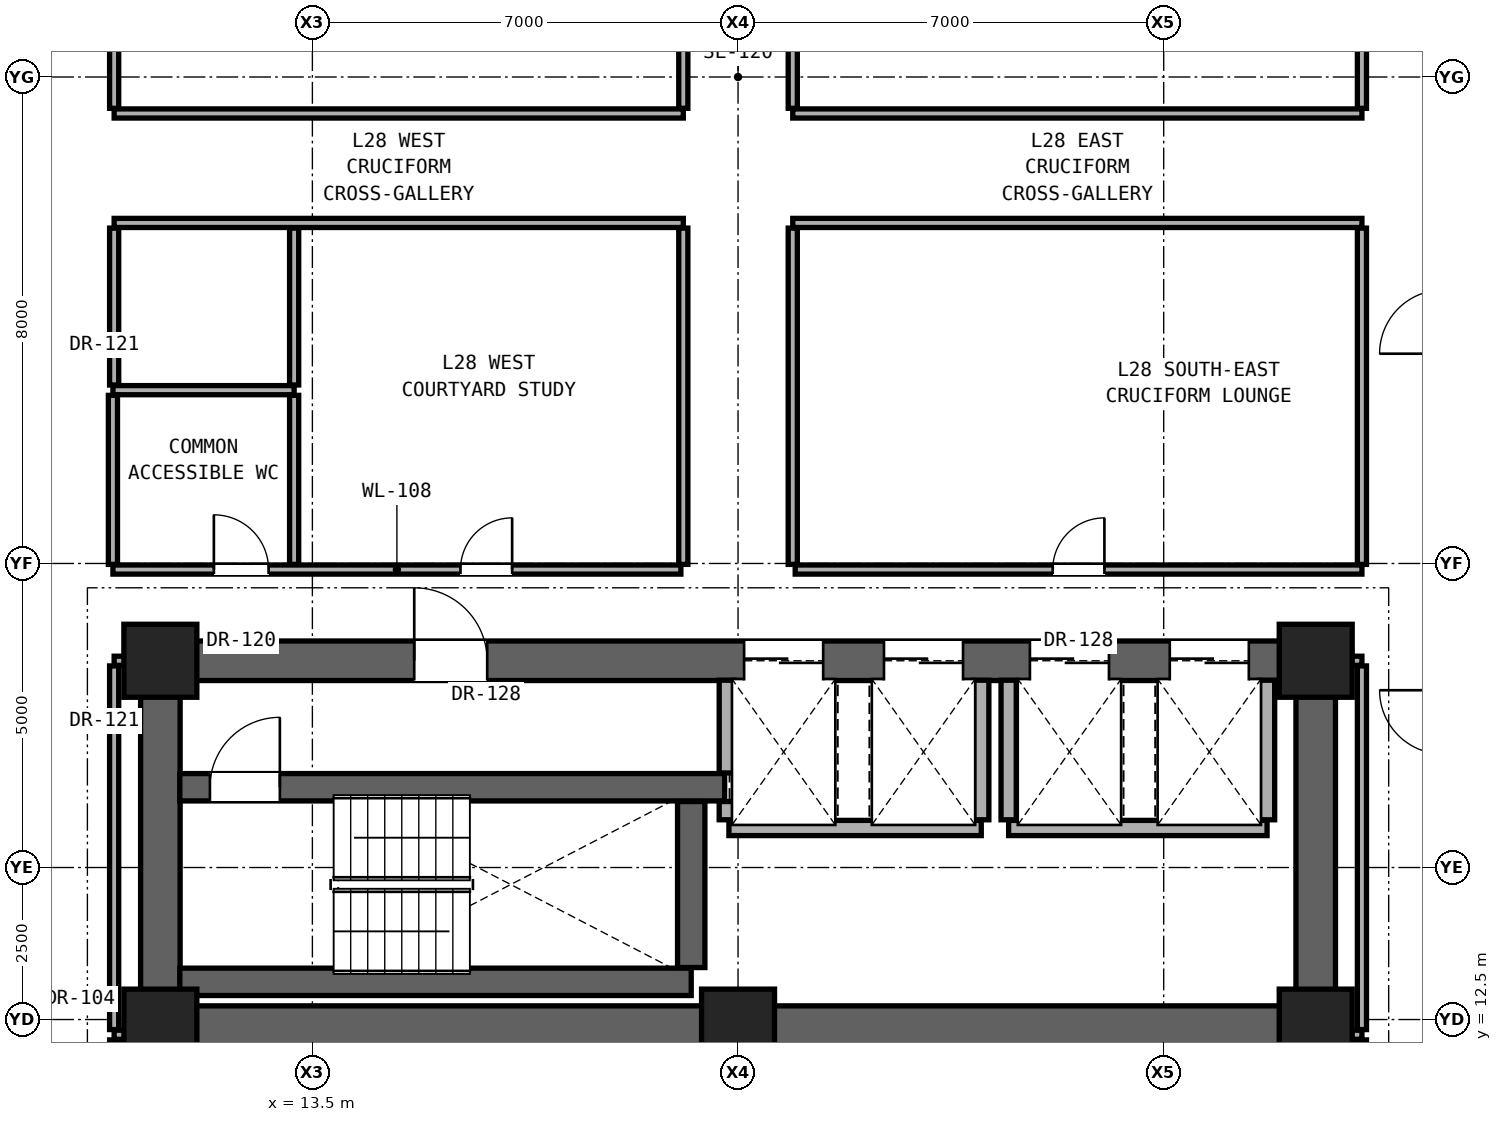
"""IFC4 building model, lengths in metres.
Left out: names, types, materials, properties, quantities, classifications, styles, units other than length and angle.
Written with IfcOpenShell. Run it as: python <this file> out.ifc"""

import sys

from ifc_helpers import new_model, si_unit, direction, frame, frame_2d, origin, origin_2d, place, context, subcontext, project, spatial, rectangle, extrude, element, fill, save


model = new_model("IFC4")
c1 = context("Model", 3, precision=1e-05, world=origin(), true_north=direction((0.0, 1.0)))
c2 = subcontext(c1, "Body", "Model", "MODEL_VIEW")
j1 = project(units=[si_unit("LENGTHUNIT", "METRE"), si_unit("PLANEANGLEUNIT", "RADIAN")], contexts=[c1])
p1 = place(None, origin())
s1 = spatial("IfcSite", under=j1, at=p1, CompositionType="ELEMENT")
p2 = place(p1, origin())
s2 = spatial("IfcBuilding", under=s1, at=p2, CompositionType="ELEMENT")
p3 = place(p2, frame((0.0, 0.0, 101.6)))
s3 = spatial("IfcBuildingStorey", under=s2, at=p3, CompositionType="ELEMENT", Elevation=101.6)
for number, where, z_axis, x_axis in (
    (1, (11.0, 12.4, 0.0), (0.0, 0.0, 1.0), (1.0, 0.0, 0.0)),
    (2, (20.5, 12.4, 0.0), (0.0, 0.0, 1.0), (1.0, 0.0, 0.0)),
    (3, (30.0, 12.4, 0.0), (0.0, 0.0, 1.0), (1.0, 0.0, 0.0)),
    (4, (11.0, 18.4, 0.0), (0.0, 0.0, 1.0), (1.0, 0.0, 0.0)),
    (5, (30.0, 18.4, 0.0), (0.0, 0.0, 1.0), (1.0, 0.0, 0.0)),
):
    element("IfcColumn", number, at=place(p3, frame(where, z_axis=z_axis, x_axis=x_axis)), inside=s3, PredefinedType="COLUMN", context=c2, shape_type="SweptSolid", body=[
        extrude(rectangle(XDim=1.2, YDim=1.2, at=origin_2d()), origin(), (0.0, 0.0, 1.0), 3.3),
    ])
p4 = place(p3, frame((11.0, 12.4, 0.0), z_axis=(0.0, 0.0, 1.0), x_axis=(1.0, 0.0, 0.0)))
e6 = element("IfcWall", 6, at=p4, inside=s3, PredefinedType="SHEAR", context=c2, shape_type="SweptSolid", body=[
    extrude(rectangle(XDim=19.0, YDim=0.65, at=frame_2d((9.5, 0.0))), origin(), (0.0, 0.0, 1.0), 3.08),
])
for number, where, z_axis, x_axis in (
    (7, (11.0, 12.4, 0.0), (0.0, 0.0, 1.0), (0.0, 1.0, 0.0)),
    (8, (30.0, 12.4, 0.0), (0.0, 0.0, 1.0), (0.0, 1.0, 0.0)),
):
    element("IfcWall", number, at=place(p3, frame(where, z_axis=z_axis, x_axis=x_axis)), inside=s3, PredefinedType="SHEAR", context=c2, shape_type="SweptSolid", body=[
        extrude(rectangle(XDim=6.0, YDim=0.65, at=frame_2d((3.0, 0.0))), origin(), (0.0, 0.0, 1.0), 3.08),
    ])
p5 = place(p3, frame((11.0, 18.4, 0.0), z_axis=(0.0, 0.0, 1.0), x_axis=(1.0, 0.0, 0.0)))
e9 = element("IfcWall", 9, at=p5, inside=s3, PredefinedType="SHEAR", context=c2, shape_type="SweptSolid", body=[
    extrude(rectangle(XDim=19.0, YDim=0.65, at=frame_2d((9.5, 0.0))), origin(), (0.0, 0.0, 1.0), 3.08),
])
p6 = place(p5, frame((4.175, 0.0, 0.0)))
e10 = element("IfcOpeningElement", 10, at=p6, cuts=e9, PredefinedType="OPENING", context=c2, shape_type="SweptSolid", body=[
    extrude(rectangle(XDim=1.2, YDim=2.25, at=frame_2d((0.6, 1.125))), frame((0.0, 0.335, 0.0), z_axis=(0.0, -1.0, 0.0), x_axis=(1.0, 0.0, 0.0)), (0.0, 0.0, 1.0), 0.67),
])
p7 = place(p5, frame((9.6, 0.0, 0.0)))
e11 = element("IfcOpeningElement", 11, at=p7, cuts=e9, PredefinedType="OPENING", context=c2, shape_type="SweptSolid", body=[
    extrude(rectangle(XDim=1.3, YDim=2.3, at=frame_2d((0.65, 1.15))), frame((0.0, 0.335, 0.0), z_axis=(0.0, -1.0, 0.0), x_axis=(1.0, 0.0, 0.0)), (0.0, 0.0, 1.0), 0.67),
])
p8 = place(p5, frame((11.9, 0.0, 0.0)))
e12 = element("IfcOpeningElement", 12, at=p8, cuts=e9, PredefinedType="OPENING", context=c2, shape_type="SweptSolid", body=[
    extrude(rectangle(XDim=1.3, YDim=2.3, at=frame_2d((0.65, 1.15))), frame((0.0, 0.335, 0.0), z_axis=(0.0, -1.0, 0.0), x_axis=(1.0, 0.0, 0.0)), (0.0, 0.0, 1.0), 0.67),
])
p9 = place(p5, frame((14.3, 0.0, 0.0)))
e13 = element("IfcOpeningElement", 13, at=p9, cuts=e9, PredefinedType="OPENING", context=c2, shape_type="SweptSolid", body=[
    extrude(rectangle(XDim=1.3, YDim=2.3, at=frame_2d((0.65, 1.15))), frame((0.0, 0.335, 0.0), z_axis=(0.0, -1.0, 0.0), x_axis=(1.0, 0.0, 0.0)), (0.0, 0.0, 1.0), 0.67),
])
p10 = place(p5, frame((16.6, 0.0, 0.0)))
e14 = element("IfcOpeningElement", 14, at=p10, cuts=e9, PredefinedType="OPENING", context=c2, shape_type="SweptSolid", body=[
    extrude(rectangle(XDim=1.3, YDim=2.3, at=frame_2d((0.65, 1.15))), frame((0.0, 0.335, 0.0), z_axis=(0.0, -1.0, 0.0), x_axis=(1.0, 0.0, 0.0)), (0.0, 0.0, 1.0), 0.67),
])
for number, where, z_axis, x_axis in (
    (15, (10.24, 12.25, 0.0), (0.0, 0.0, 1.0), (1.0, 0.0, 0.0)),
    (16, (30.32, 12.25, 0.0), (0.0, 0.0, 1.0), (1.0, 0.0, 0.0)),
):
    element("IfcWall", number, at=place(p3, frame(where, z_axis=z_axis, x_axis=x_axis)), inside=s3, PredefinedType="PARTITIONING", context=c2, shape_type="SweptSolid", body=[
        extrude(rectangle(XDim=0.44, YDim=0.15, at=frame_2d((0.22, 0.0))), origin(), (0.0, 0.0, 1.0), 3.08),
    ])
p11 = place(p3, frame((11.32, 13.12, 0.0), z_axis=(0.0, 0.0, 1.0), x_axis=(1.0, 0.0, 0.0)))
e17 = element("IfcWall", 17, at=p11, inside=s3, PredefinedType="SHEAR", context=c2, shape_type="SweptSolid", body=[
    extrude(rectangle(XDim=8.41, YDim=0.45, at=frame_2d((4.205, 0.0))), origin(), (0.0, 0.0, 1.0), 3.08),
])
p12 = place(p3, frame((20.35, 15.65, 0.0), z_axis=(0.0, 0.0, 1.0), x_axis=(1.0, 0.0, 0.0)))
e18 = element("IfcWall", 18, at=p12, inside=s3, PredefinedType="SOLIDWALL", context=c2, shape_type="SweptSolid", body=[
    extrude(rectangle(XDim=4.15, YDim=0.25, at=frame_2d((2.075, 0.0))), origin(), (0.0, 0.0, 1.0), 3.08),
])
p13 = place(p3, frame((24.95, 15.65, 0.0), z_axis=(0.0, 0.0, 1.0), x_axis=(1.0, 0.0, 0.0)))
e19 = element("IfcWall", 19, at=p13, inside=s3, PredefinedType="SOLIDWALL", context=c2, shape_type="SweptSolid", body=[
    extrude(rectangle(XDim=4.25, YDim=0.25, at=frame_2d((2.125, 0.0))), origin(), (0.0, 0.0, 1.0), 3.08),
])
p14 = place(p3, frame((11.32, 16.32, 0.0), z_axis=(0.0, 0.0, 1.0), x_axis=(1.0, 0.0, 0.0)))
e20 = element("IfcWall", 20, at=p14, inside=s3, PredefinedType="SHEAR", context=c2, shape_type="SweptSolid", body=[
    extrude(rectangle(XDim=8.96, YDim=0.45, at=frame_2d((4.48, 0.0))), origin(), (0.0, 0.0, 1.0), 3.08),
])
p15 = place(p14, frame((0.495, 0.0, 0.0)))
e21 = element("IfcOpeningElement", 21, at=p15, cuts=e20, PredefinedType="OPENING", context=c2, shape_type="SweptSolid", body=[
    extrude(rectangle(XDim=1.15, YDim=2.2, at=frame_2d((0.575, 1.1))), frame((0.0, 0.235, 0.0), z_axis=(0.0, -1.0, 0.0), x_axis=(1.0, 0.0, 0.0)), (0.0, 0.0, 1.0), 0.47),
])
for number, where, z_axis, x_axis in (
    (22, (10.24, 18.4, 0.0), (0.0, 0.0, 1.0), (1.0, 0.0, 0.0)),
    (23, (30.32, 18.4, 0.0), (0.0, 0.0, 1.0), (1.0, 0.0, 0.0)),
):
    element("IfcWall", number, at=place(p3, frame(where, z_axis=z_axis, x_axis=x_axis)), inside=s3, PredefinedType="PARTITIONING", context=c2, shape_type="SweptSolid", body=[
        extrude(rectangle(XDim=0.44, YDim=0.15, at=frame_2d((0.22, 0.0))), origin(), (0.0, 0.0, 1.0), 2.456),
    ])
p16 = place(p3, frame((10.22, 19.9, 0.0), z_axis=(0.0, 0.0, 1.0), x_axis=(1.0, 0.0, 0.0)))
e24 = element("IfcWall", 24, at=p16, inside=s3, PredefinedType="PARTITIONING", context=c2, shape_type="SweptSolid", body=[
    extrude(rectangle(XDim=9.34, YDim=0.15, at=frame_2d((4.67, 0.0))), origin(), (0.0, 0.0, 1.0), 2.124),
])
p17 = place(p16, frame((1.66, 0.0, 0.0)))
e25 = element("IfcOpeningElement", 25, at=p17, cuts=e24, PredefinedType="OPENING", context=c2, shape_type="SweptSolid", body=[
    extrude(rectangle(XDim=0.9, YDim=2.1, at=frame_2d((0.45, 1.05))), frame((0.0, 0.085, 0.0), z_axis=(0.0, -1.0, 0.0), x_axis=(1.0, 0.0, 0.0)), (0.0, 0.0, 1.0), 0.17),
])
p18 = place(p16, frame((5.715, 0.0, 0.0)))
e26 = element("IfcOpeningElement", 26, at=p18, cuts=e24, PredefinedType="OPENING", context=c2, shape_type="SweptSolid", body=[
    extrude(rectangle(XDim=0.85, YDim=2.01, at=frame_2d((0.425, 1.005))), frame((0.0, 0.085, 0.0), z_axis=(0.0, -1.0, 0.0), x_axis=(1.0, 0.0, 0.0)), (0.0, 0.0, 1.0), 0.17),
])
p19 = place(p3, frame((21.44, 19.9, 0.0), z_axis=(0.0, 0.0, 1.0), x_axis=(1.0, 0.0, 0.0)))
e27 = element("IfcWall", 27, at=p19, inside=s3, PredefinedType="PARTITIONING", context=c2, shape_type="SweptSolid", body=[
    extrude(rectangle(XDim=9.32, YDim=0.15, at=frame_2d((4.66, 0.0))), origin(), (0.0, 0.0, 1.0), 2.124),
])
p20 = place(p19, frame((4.235, 0.0, 0.0)))
e28 = element("IfcOpeningElement", 28, at=p20, cuts=e27, PredefinedType="OPENING", context=c2, shape_type="SweptSolid", body=[
    extrude(rectangle(XDim=0.85, YDim=2.01, at=frame_2d((0.425, 1.005))), frame((0.0, 0.085, 0.0), z_axis=(0.0, -1.0, 0.0), x_axis=(1.0, 0.0, 0.0)), (0.0, 0.0, 1.0), 0.17),
])
p21 = place(p3, frame((10.22, 22.85, 0.0), z_axis=(0.0, 0.0, 1.0), x_axis=(1.0, 0.0, 0.0)))
e29 = element("IfcWall", 29, at=p21, inside=s3, PredefinedType="PARTITIONING", context=c2, shape_type="SweptSolid", body=[
    extrude(rectangle(XDim=2.98, YDim=0.15, at=frame_2d((1.49, 0.0))), origin(), (0.0, 0.0, 1.0), 2.124),
])
for number, where, z_axis, x_axis in (
    (30, (10.24, 25.6, 0.0), (0.0, 0.0, 1.0), (1.0, 0.0, 0.0)),
    (31, (21.4, 25.6, 0.0), (0.0, 0.0, 1.0), (1.0, 0.0, 0.0)),
    (32, (10.24, 27.4, 0.0), (0.0, 0.0, 1.0), (1.0, 0.0, 0.0)),
    (33, (21.4, 27.4, 0.0), (0.0, 0.0, 1.0), (1.0, 0.0, 0.0)),
):
    element("IfcWall", number, at=place(p3, frame(where, z_axis=z_axis, x_axis=x_axis)), inside=s3, PredefinedType="PARTITIONING", context=c2, shape_type="SweptSolid", body=[
        extrude(rectangle(XDim=9.36, YDim=0.15, at=frame_2d((4.68, 0.0))), origin(), (0.0, 0.0, 1.0), 2.124),
    ])
p22 = place(p3, frame((10.22, 19.985, 0.0), z_axis=(0.0, 0.0, 1.0), x_axis=(0.0, 1.0, 0.0)))
e34 = element("IfcWall", 34, at=p22, inside=s3, PredefinedType="PARTITIONING", context=c2, shape_type="SweptSolid", body=[
    extrude(rectangle(XDim=2.78, YDim=0.15, at=frame_2d((1.39, 0.0))), origin(), (0.0, 0.0, 1.0), 3.08),
])
p23 = place(p3, frame((10.24, 9.078, 0.0), z_axis=(0.0, 0.0, 1.0), x_axis=(0.0, 1.0, 0.0)))
e35 = element("IfcWall", 35, at=p23, inside=s3, PredefinedType="PARTITIONING", context=c2, shape_type="SweptSolid", body=[
    extrude(rectangle(XDim=3.087, YDim=0.15, at=frame_2d((1.543, 0.0))), origin(), (0.0, 0.0, 1.0), 3.08),
])
p24 = place(p23, frame((1.019, 0.0, 0.0)))
e36 = element("IfcOpeningElement", 36, at=p24, cuts=e35, PredefinedType="OPENING", context=c2, shape_type="SweptSolid", body=[
    extrude(rectangle(XDim=1.05, YDim=2.2, at=frame_2d((0.525, 1.1))), frame((0.0, 0.085, 0.0), z_axis=(0.0, -1.0, 0.0), x_axis=(1.0, 0.0, 0.0)), (0.0, 0.0, 1.0), 0.17),
])
p25 = place(p3, frame((10.24, 12.335, 0.0), z_axis=(0.0, 0.0, 1.0), x_axis=(0.0, 1.0, 0.0)))
e37 = element("IfcWall", 37, at=p25, inside=s3, PredefinedType="PARTITIONING", context=c2, shape_type="SweptSolid", body=[
    extrude(rectangle(XDim=5.98, YDim=0.15, at=frame_2d((2.99, 0.0))), origin(), (0.0, 0.0, 1.0), 2.456),
])
p26 = place(p3, frame((10.24, 22.935, 0.0), z_axis=(0.0, 0.0, 1.0), x_axis=(0.0, 1.0, 0.0)))
e38 = element("IfcWall", 38, at=p26, inside=s3, PredefinedType="PARTITIONING", context=c2, shape_type="SweptSolid", body=[
    extrude(rectangle(XDim=2.58, YDim=0.15, at=frame_2d((1.29, 0.0))), origin(), (0.0, 0.0, 1.0), 2.299),
])
p27 = place(p3, frame((10.24, 27.485, 0.0), z_axis=(0.0, 0.0, 1.0), x_axis=(0.0, 1.0, 0.0)))
e39 = element("IfcWall", 39, at=p27, inside=s3, PredefinedType="PARTITIONING", context=c2, shape_type="SweptSolid", body=[
    extrude(rectangle(XDim=5.53, YDim=0.15, at=frame_2d((2.765, 0.0))), origin(), (0.0, 0.0, 1.0), 2.299),
])
p28 = place(p27, frame((2.29, 0.0, 0.0)))
e40 = element("IfcOpeningElement", 40, at=p28, cuts=e39, PredefinedType="OPENING", context=c2, shape_type="SweptSolid", body=[
    extrude(rectangle(XDim=0.95, YDim=2.15, at=frame_2d((0.475, 1.075))), frame((0.0, 0.085, 0.0), z_axis=(0.0, -1.0, 0.0), x_axis=(1.0, 0.0, 0.0)), (0.0, 0.0, 1.0), 0.17),
])
p29 = place(p3, frame((13.2, 19.985, 0.0), z_axis=(0.0, 0.0, 1.0), x_axis=(0.0, 1.0, 0.0)))
e41 = element("IfcWall", 41, at=p29, inside=s3, PredefinedType="PARTITIONING", context=c2, shape_type="SweptSolid", body=[
    extrude(rectangle(XDim=2.78, YDim=0.15, at=frame_2d((1.39, 0.0))), origin(), (0.0, 0.0, 1.0), 3.08),
])
p30 = place(p3, frame((13.2, 22.935, 0.0), z_axis=(0.0, 0.0, 1.0), x_axis=(0.0, 1.0, 0.0)))
e42 = element("IfcWall", 42, at=p30, inside=s3, PredefinedType="PARTITIONING", context=c2, shape_type="SweptSolid", body=[
    extrude(rectangle(XDim=2.58, YDim=0.15, at=frame_2d((1.29, 0.0))), origin(), (0.0, 0.0, 1.0), 2.124),
])
for number, where, z_axis, x_axis in (
    (43, (19.6, 19.985, 0.0), (0.0, 0.0, 1.0), (0.0, 1.0, 0.0)),
    (44, (19.6, 27.485, 0.0), (0.0, 0.0, 1.0), (0.0, 1.0, 0.0)),
):
    element("IfcWall", number, at=place(p3, frame(where, z_axis=z_axis, x_axis=x_axis)), inside=s3, PredefinedType="PARTITIONING", context=c2, shape_type="SweptSolid", body=[
        extrude(rectangle(XDim=5.53, YDim=0.15, at=frame_2d((2.765, 0.0))), origin(), (0.0, 0.0, 1.0), 2.124),
    ])
p31 = place(p3, frame((19.73, 13.355, 0.0), z_axis=(0.0, 0.0, 1.0), x_axis=(0.0, 1.0, 0.0)))
e45 = element("IfcWall", 45, at=p31, inside=s3, PredefinedType="SHEAR", context=c2, shape_type="SweptSolid", body=[
    extrude(rectangle(XDim=2.73, YDim=0.45, at=frame_2d((1.365, 0.0))), origin(), (0.0, 0.0, 1.0), 3.08),
])
p32 = place(p3, frame((20.315, 15.785, 0.0), z_axis=(0.0, 0.0, 1.0), x_axis=(0.0, 1.0, 0.0)))
e46 = element("IfcWall", 46, at=p32, inside=s3, PredefinedType="SOLIDWALL", context=c2, shape_type="SweptSolid", body=[
    extrude(rectangle(XDim=0.3, YDim=0.25, at=frame_2d((0.15, 0.0))), origin(), (0.0, 0.0, 1.0), 3.08),
])
p33 = place(p3, frame((20.315, 16.555, 0.0), z_axis=(0.0, 0.0, 1.0), x_axis=(0.0, 1.0, 0.0)))
e47 = element("IfcWall", 47, at=p33, inside=s3, PredefinedType="SOLIDWALL", context=c2, shape_type="SweptSolid", body=[
    extrude(rectangle(XDim=1.525, YDim=0.25, at=frame_2d((0.763, 0.0))), origin(), (0.0, 0.0, 1.0), 3.08),
])
for number, where, z_axis, x_axis in (
    (48, (21.4, 19.985, 0.0), (0.0, 0.0, 1.0), (0.0, 1.0, 0.0)),
    (49, (21.4, 27.485, 0.0), (0.0, 0.0, 1.0), (0.0, 1.0, 0.0)),
):
    element("IfcWall", number, at=place(p3, frame(where, z_axis=z_axis, x_axis=x_axis)), inside=s3, PredefinedType="PARTITIONING", context=c2, shape_type="SweptSolid", body=[
        extrude(rectangle(XDim=5.53, YDim=0.15, at=frame_2d((2.765, 0.0))), origin(), (0.0, 0.0, 1.0), 2.124),
    ])
for number, where, z_axis, x_axis in (
    (50, (24.5, 15.785, 0.0), (0.0, 0.0, 1.0), (0.0, 1.0, 0.0)),
    (51, (24.95, 15.785, 0.0), (0.0, 0.0, 1.0), (0.0, 1.0, 0.0)),
    (52, (29.2, 15.785, 0.0), (0.0, 0.0, 1.0), (0.0, 1.0, 0.0)),
):
    element("IfcWall", number, at=place(p3, frame(where, z_axis=z_axis, x_axis=x_axis)), inside=s3, PredefinedType="SOLIDWALL", context=c2, shape_type="SweptSolid", body=[
        extrude(rectangle(XDim=2.295, YDim=0.25, at=frame_2d((1.147, 0.0))), origin(), (0.0, 0.0, 1.0), 3.08),
    ])
p34 = place(p3, frame((30.76, 9.078, 0.0), z_axis=(0.0, 0.0, 1.0), x_axis=(0.0, 1.0, 0.0)))
e53 = element("IfcWall", 53, at=p34, inside=s3, PredefinedType="PARTITIONING", context=c2, shape_type="SweptSolid", body=[
    extrude(rectangle(XDim=3.087, YDim=0.15, at=frame_2d((1.543, 0.0))), origin(), (0.0, 0.0, 1.0), 3.08),
])
p35 = place(p34, frame((1.019, 0.0, 0.0)))
e54 = element("IfcOpeningElement", 54, at=p35, cuts=e53, PredefinedType="OPENING", context=c2, shape_type="SweptSolid", body=[
    extrude(rectangle(XDim=1.05, YDim=2.2, at=frame_2d((0.525, 1.1))), frame((0.0, 0.085, 0.0), z_axis=(0.0, -1.0, 0.0), x_axis=(1.0, 0.0, 0.0)), (0.0, 0.0, 1.0), 0.17),
])
p36 = place(p3, frame((30.76, 12.335, 0.0), z_axis=(0.0, 0.0, 1.0), x_axis=(0.0, 1.0, 0.0)))
e55 = element("IfcWall", 55, at=p36, inside=s3, PredefinedType="PARTITIONING", context=c2, shape_type="SweptSolid", body=[
    extrude(rectangle(XDim=5.98, YDim=0.15, at=frame_2d((2.99, 0.0))), origin(), (0.0, 0.0, 1.0), 2.456),
])
for number, where, z_axis, x_axis in (
    (56, (30.76, 19.985, 0.0), (0.0, 0.0, 1.0), (0.0, 1.0, 0.0)),
    (57, (30.76, 27.485, 0.0), (0.0, 0.0, 1.0), (0.0, 1.0, 0.0)),
):
    element("IfcWall", number, at=place(p3, frame(where, z_axis=z_axis, x_axis=x_axis)), inside=s3, PredefinedType="PARTITIONING", context=c2, shape_type="SweptSolid", body=[
        extrude(rectangle(XDim=5.53, YDim=0.15, at=frame_2d((2.765, 0.0))), origin(), (0.0, 0.0, 1.0), 2.299),
    ])
p37 = place(p6, origin())
e58 = element("IfcDoor", 58, at=p37, inside=s3, OperationType="SINGLE_SWING_LEFT", PredefinedType="DOOR", context=c2, shape_type="SweptSolid", body=[
    extrude(rectangle(XDim=1.2, YDim=2.25, at=frame_2d((0.6, 1.125))), frame((0.0, 0.025, 0.0), z_axis=(0.0, -1.0, 0.0), x_axis=(1.0, 0.0, 0.0)), (0.0, 0.0, 1.0), 0.05),
])
fill(e10, e58)
p38 = place(p15, origin())
e59 = element("IfcDoor", 59, at=p38, inside=s3, OperationType="SINGLE_SWING_RIGHT", PredefinedType="DOOR", context=c2, shape_type="SweptSolid", body=[
    extrude(rectangle(XDim=1.15, YDim=2.2, at=frame_2d((0.575, 1.1))), frame((0.0, 0.025, 0.0), z_axis=(0.0, -1.0, 0.0), x_axis=(1.0, 0.0, 0.0)), (0.0, 0.0, 1.0), 0.05),
])
fill(e21, e59)
p39 = place(p17, origin())
e60 = element("IfcDoor", 60, at=p39, inside=s3, OperationType="SINGLE_SWING_LEFT", PredefinedType="DOOR", context=c2, shape_type="SweptSolid", body=[
    extrude(rectangle(XDim=0.9, YDim=2.1, at=frame_2d((0.45, 1.05))), frame((0.0, 0.025, 0.0), z_axis=(0.0, -1.0, 0.0), x_axis=(1.0, 0.0, 0.0)), (0.0, 0.0, 1.0), 0.05),
])
fill(e25, e60)
p40 = place(p18, origin())
e61 = element("IfcDoor", 61, at=p40, inside=s3, OperationType="SINGLE_SWING_RIGHT", PredefinedType="DOOR", context=c2, shape_type="SweptSolid", body=[
    extrude(rectangle(XDim=0.85, YDim=2.01, at=frame_2d((0.425, 1.005))), frame((0.0, 0.025, 0.0), z_axis=(0.0, -1.0, 0.0), x_axis=(1.0, 0.0, 0.0)), (0.0, 0.0, 1.0), 0.05),
])
fill(e26, e61)
p41 = place(p20, origin())
e62 = element("IfcDoor", 62, at=p41, inside=s3, OperationType="SINGLE_SWING_RIGHT", PredefinedType="DOOR", context=c2, shape_type="SweptSolid", body=[
    extrude(rectangle(XDim=0.85, YDim=2.01, at=frame_2d((0.425, 1.005))), frame((0.0, 0.025, 0.0), z_axis=(0.0, -1.0, 0.0), x_axis=(1.0, 0.0, 0.0)), (0.0, 0.0, 1.0), 0.05),
])
fill(e28, e62)
p42 = place(p7, origin())
e63 = element("IfcDoor", 63, at=p42, inside=s3, OperationType="DOUBLE_DOOR_SLIDING", PredefinedType="DOOR", context=c2, shape_type="SweptSolid", body=[
    extrude(rectangle(XDim=1.3, YDim=2.3, at=frame_2d((0.65, 1.15))), frame((0.0, 0.025, 0.0), z_axis=(0.0, -1.0, 0.0), x_axis=(1.0, 0.0, 0.0)), (0.0, 0.0, 1.0), 0.05),
])
fill(e11, e63)
p43 = place(p8, origin())
e64 = element("IfcDoor", 64, at=p43, inside=s3, OperationType="DOUBLE_DOOR_SLIDING", PredefinedType="DOOR", context=c2, shape_type="SweptSolid", body=[
    extrude(rectangle(XDim=1.3, YDim=2.3, at=frame_2d((0.65, 1.15))), frame((0.0, 0.025, 0.0), z_axis=(0.0, -1.0, 0.0), x_axis=(1.0, 0.0, 0.0)), (0.0, 0.0, 1.0), 0.05),
])
fill(e12, e64)
p44 = place(p9, origin())
e65 = element("IfcDoor", 65, at=p44, inside=s3, OperationType="DOUBLE_DOOR_SLIDING", PredefinedType="DOOR", context=c2, shape_type="SweptSolid", body=[
    extrude(rectangle(XDim=1.3, YDim=2.3, at=frame_2d((0.65, 1.15))), frame((0.0, 0.025, 0.0), z_axis=(0.0, -1.0, 0.0), x_axis=(1.0, 0.0, 0.0)), (0.0, 0.0, 1.0), 0.05),
])
fill(e13, e65)
p45 = place(p10, origin())
e66 = element("IfcDoor", 66, at=p45, inside=s3, OperationType="DOUBLE_DOOR_SLIDING", PredefinedType="DOOR", context=c2, shape_type="SweptSolid", body=[
    extrude(rectangle(XDim=1.3, YDim=2.3, at=frame_2d((0.65, 1.15))), frame((0.0, 0.025, 0.0), z_axis=(0.0, -1.0, 0.0), x_axis=(1.0, 0.0, 0.0)), (0.0, 0.0, 1.0), 0.05),
])
fill(e14, e66)
save(model, sys.argv[1])
